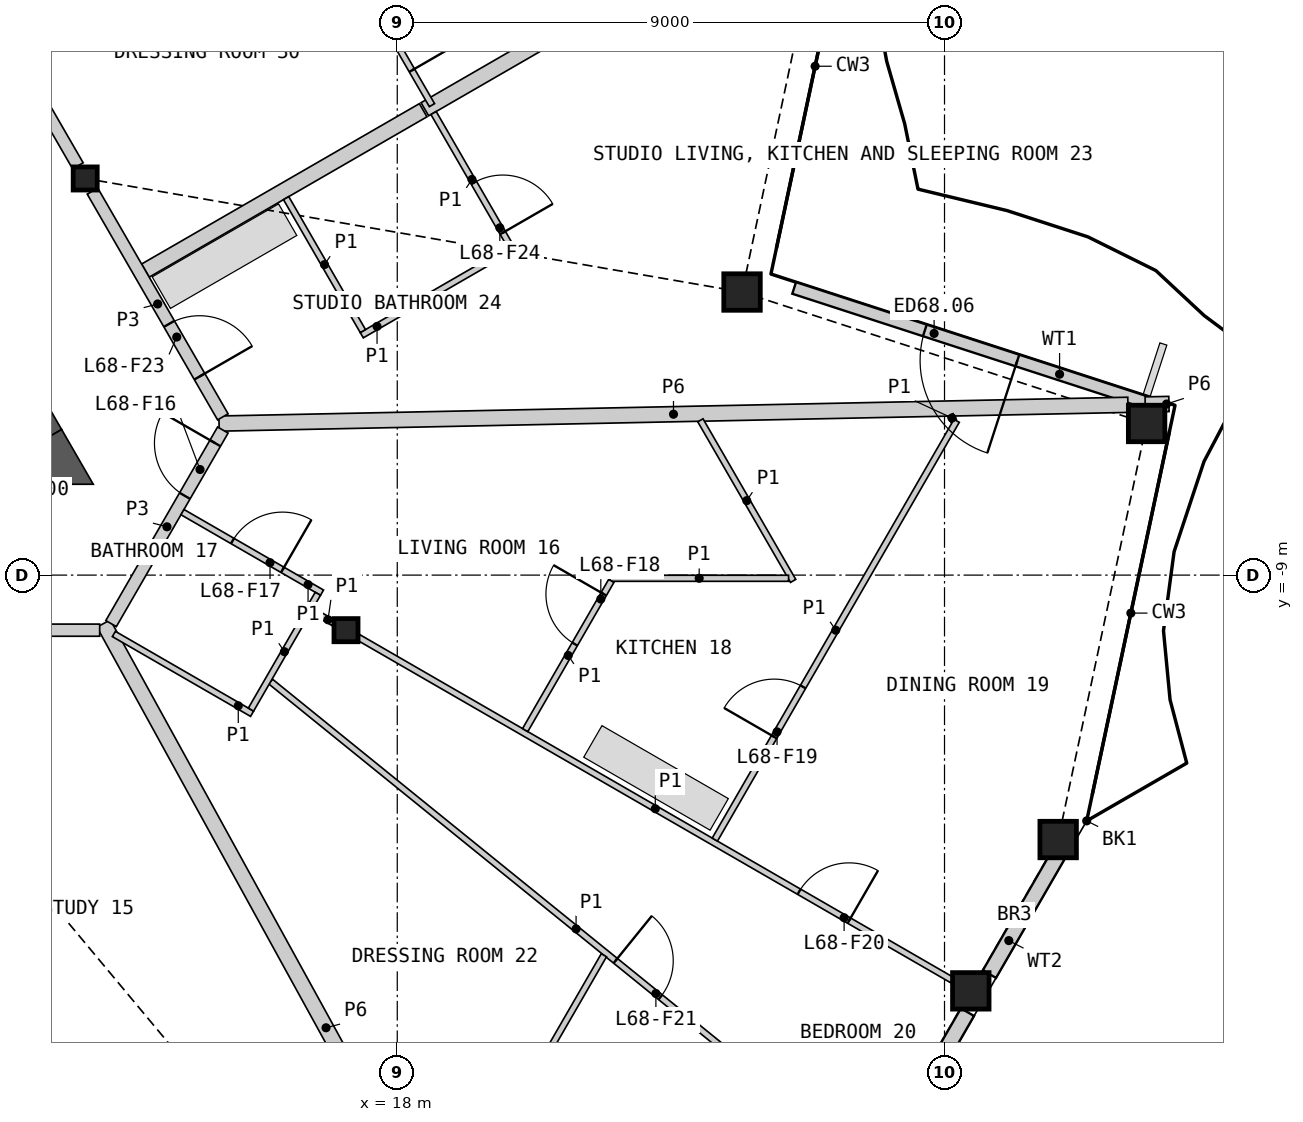
"""IFC4 building model, lengths in metres.
Left out: names, types, materials, properties, quantities, classifications, styles, units other than length and angle.
Written with IfcOpenShell. Run it as: python <this file> out.ifc"""

import sys

from ifc_helpers import new_model, si_unit, direction, frame, frame_2d, origin, origin_2d, place, context, subcontext, project, spatial, polyline, rectangle, hollow_rectangle, i_section, outline, extrude, element, fill, save


model = new_model("IFC4")
c1 = context("Model", 3, precision=1e-05, world=origin(), true_north=direction((0.0, 1.0)))
c2 = subcontext(c1, "Body", "Model", "MODEL_VIEW")
j1 = project(units=[si_unit("LENGTHUNIT", "METRE"), si_unit("PLANEANGLEUNIT", "RADIAN")], contexts=[c1])
p1 = place(None, origin())
s1 = spatial("IfcSite", under=j1, at=p1, CompositionType="ELEMENT")
p2 = place(p1, origin())
s2 = spatial("IfcBuilding", under=s1, at=p2, CompositionType="ELEMENT")
p3 = place(p2, frame((0.0, 0.0, 312.0)))
s3 = spatial("IfcBuildingStorey", under=s2, at=p3, CompositionType="ELEMENT", Elevation=312.0)
for number, where, z_axis, x_axis in (
    (1, (27.432, -15.838, 0.0), (0.0, 0.0, 1.0), (1.0, 0.0, 0.0)),
    (2, (28.869, -13.349, 0.0), (0.0, 0.0, 1.0), (1.0, 0.0, 0.0)),
    (3, (30.324, -6.506, 0.0), (0.0, 0.0, 1.0), (1.0, 0.0, 0.0)),
    (4, (23.67, -4.344, 0.0), (0.0, 0.0, 1.0), (1.0, 0.0, 0.0)),
):
    element("IfcColumn", number, at=place(p3, frame(where, z_axis=z_axis, x_axis=x_axis)), inside=s3, PredefinedType="COLUMN", context=c2, shape_type="SweptSolid", body=[
        extrude(hollow_rectangle(XDim=0.6, YDim=0.6, WallThickness=0.04, at=origin_2d()), origin(), (0.0, 0.0, 1.0), 3.4),
    ])
for number, where, z_axis, x_axis in (
    (5, (17.157, -9.906, 0.0), (0.0, 0.0, 1.0), (1.0, 0.0, 0.0)),
    (6, (12.868, -2.476, 0.0), (0.0, 0.0, 1.0), (1.0, 0.0, 0.0)),
):
    element("IfcColumn", number, at=place(p3, frame(where, z_axis=z_axis, x_axis=x_axis)), inside=s3, PredefinedType="COLUMN", context=c2, shape_type="SweptSolid", body=[
        extrude(i_section(OverallWidth=0.396, OverallDepth=0.381, WebThickness=0.019, FlangeThickness=0.03, at=origin_2d()), origin(), (0.0, 0.0, 1.0), 3.4),
    ])
p4 = place(p3, frame((26.073, -18.448, 0.0), z_axis=(0.0, 0.0, 1.0), x_axis=(0.499992367345, 0.866029810455, 0.0)))
e7 = element("IfcWall", 7, at=p4, inside=s3, PredefinedType="SOLIDWALL", context=c2, shape_type="SweptSolid", body=[
    extrude(rectangle(XDim=2.61, YDim=0.25, at=frame_2d((1.305, 0.0))), origin(), (0.0, 0.0, 1.0), 2.488),
])
p5 = place(p4, frame((0.7, 0.0, 1.6)))
e8 = element("IfcOpeningElement", 8, at=p5, cuts=e7, PredefinedType="OPENING", context=c2, shape_type="SweptSolid", body=[
    extrude(rectangle(XDim=0.9, YDim=0.6, at=frame_2d((0.45, 0.3))), frame((0.0, 0.135, 0.0), z_axis=(0.0, -1.0, 0.0), x_axis=(1.0, 0.0, 0.0)), (0.0, 0.0, 1.0), 0.27),
])
p6 = place(p3, frame((27.739, -15.563, 0.0), z_axis=(0.0, 0.0, 1.0), x_axis=(0.500012659481, 0.866018094706, 0.0)))
e9 = element("IfcWall", 9, at=p6, inside=s3, PredefinedType="SOLIDWALL", context=c2, shape_type="SweptSolid", body=[
    extrude(rectangle(XDim=2.549, YDim=0.25, at=frame_2d((1.274, 0.0))), origin(), (0.0, 0.0, 1.0), 2.488),
])
p7 = place(p3, frame((30.347, -6.168, 0.0), z_axis=(0.0, 0.0, 1.0), x_axis=(-0.951053709789, 0.309025631781, 0.0)))
e10 = element("IfcWall", 10, at=p7, inside=s3, PredefinedType="SOLIDWALL", context=c2, shape_type="SweptSolid", body=[
    extrude(rectangle(XDim=6.12, YDim=0.2, at=frame_2d((3.06, 0.0))), origin(), (0.0, 0.0, 1.0), 2.488),
])
p8 = place(p7, frame((2.26, 0.0, 0.0)))
e11 = element("IfcOpeningElement", 11, at=p8, cuts=e10, PredefinedType="OPENING", context=c2, shape_type="SweptSolid", body=[
    extrude(rectangle(XDim=1.6, YDim=2.25, at=frame_2d((0.8, 1.125))), frame((0.0, 0.11, 0.0), z_axis=(0.0, -1.0, 0.0), x_axis=(1.0, 0.0, 0.0)), (0.0, 0.0, 1.0), 0.22),
])
p9 = place(p3, frame((12.221, -6.756, 0.0), z_axis=(0.0, 0.0, 1.0), x_axis=(-0.50000604952, 0.866021911064, 0.0)))
e12 = element("IfcWall", 12, at=p9, inside=s3, PredefinedType="SHEAR", context=c2, shape_type="SweptSolid", body=[
    extrude(rectangle(XDim=4.869, YDim=0.6, at=frame_2d((2.434, 0.0))), origin(), (0.0, 0.0, 1.0), 3.1),
])
p10 = place(p3, origin())
e13 = element("IfcWall", 13, at=p10, inside=s3, PredefinedType="SHEAR", context=c2, shape_type="SweptSolid", body=[
    extrude(outline(polyline([(11.961, -7.506), (11.961, -6.906), (12.48, -6.606), (13.0, -7.506), (11.961, -7.506)])), origin(), (0.0, 0.0, 1.0), 3.1),
])
p11 = place(p3, frame((13.171, -9.796, 0.0), z_axis=(0.0, 0.0, 1.0), x_axis=(0.481999020381, -0.876171755053, 0.0)))
e14 = element("IfcWall", 14, at=p11, inside=s3, PredefinedType="PARTITIONING", context=c2, shape_type="SweptSolid", body=[
    extrude(rectangle(XDim=15.178, YDim=0.25, at=frame_2d((7.589, 0.0))), origin(), (0.0, 0.0, 1.0), 2.33),
])
p12 = place(p3, frame((15.069, -6.508, 0.0), z_axis=(0.0, 0.0, 1.0), x_axis=(0.999786619639, 0.02065708573, 0.0)))
e15 = element("IfcWall", 15, at=p12, inside=s3, PredefinedType="PARTITIONING", context=c2, shape_type="SweptSolid", body=[
    extrude(rectangle(XDim=14.951, YDim=0.25, at=frame_2d((7.475, 0.0))), origin(), (0.0, 0.0, 1.0), 2.33),
])
p13 = place(p3, frame((8.698, 4.745, 0.0), z_axis=(0.0, 0.0, 1.0), x_axis=(0.499984266882, -0.866034487114, 0.0)))
e16 = element("IfcWall", 16, at=p13, inside=s3, PredefinedType="PARTITIONING", context=c2, shape_type="SweptSolid", body=[
    extrude(rectangle(XDim=8.099, YDim=0.2, at=frame_2d((4.049, 0.0))), origin(), (0.0, 0.0, 1.0), 3.1),
])
p14 = place(p3, frame((18.454, -1.338, 0.0), z_axis=(0.0, 0.0, 1.0), x_axis=(0.866023407002, 0.500003458512, 0.0)))
e17 = element("IfcWall", 17, at=p14, inside=s3, PredefinedType="PARTITIONING", context=c2, shape_type="SweptSolid", body=[
    extrude(rectangle(XDim=7.345, YDim=0.25, at=frame_2d((3.673, 0.0))), origin(), (0.0, 0.0, 1.0), 2.33),
])
p15 = place(p3, frame((13.858, -3.991, 0.0), z_axis=(0.0, 0.0, 1.0), x_axis=(0.866032983855, 0.499986870703, 0.0)))
e18 = element("IfcWall", 18, at=p15, inside=s3, PredefinedType="PARTITIONING", context=c2, shape_type="SweptSolid", body=[
    extrude(rectangle(XDim=5.275, YDim=0.25, at=frame_2d((2.638, 0.0))), origin(), (0.0, 0.0, 1.0), 2.33),
])
p16 = place(p3, frame((8.786, -9.906, 0.0), z_axis=(0.0, 0.0, 1.0), x_axis=(1.0, 0.0, 0.0)))
e19 = element("IfcWall", 19, at=p16, inside=s3, PredefinedType="PARTITIONING", context=c2, shape_type="SweptSolid", body=[
    extrude(rectangle(XDim=4.32, YDim=0.2, at=frame_2d((2.16, 0.0))), origin(), (0.0, 0.0, 1.0), 3.1),
])
p17 = place(p3, frame((12.988, -2.684, 0.0), z_axis=(0.0, 0.0, 1.0), x_axis=(0.500003406062, -0.866023437285, 0.0)))
e20 = element("IfcWall", 20, at=p17, inside=s3, PredefinedType="PARTITIONING", context=c2, shape_type="SweptSolid", body=[
    extrude(rectangle(XDim=4.288, YDim=0.2, at=frame_2d((2.144, 0.0))), origin(), (0.0, 0.0, 1.0), 3.1),
])
p18 = place(p17, frame((2.521, 0.0, 0.0)))
e21 = element("IfcOpeningElement", 21, at=p18, cuts=e20, PredefinedType="OPENING", context=c2, shape_type="SweptSolid", body=[
    extrude(rectangle(XDim=1.0, YDim=2.1, at=frame_2d((0.5, 1.05))), frame((0.0, 0.11, 0.0), z_axis=(0.0, -1.0, 0.0), x_axis=(1.0, 0.0, 0.0)), (0.0, 0.0, 1.0), 0.22),
])
p19 = place(p3, frame((13.293, -9.797, 0.0), z_axis=(0.0, 0.0, 1.0), x_axis=(0.499967746641, 0.866044024469, 0.0)))
e22 = element("IfcWall", 22, at=p19, inside=s3, PredefinedType="PARTITIONING", context=c2, shape_type="SweptSolid", body=[
    extrude(rectangle(XDim=3.676, YDim=0.2, at=frame_2d((1.838, 0.0))), origin(), (0.0, 0.0, 1.0), 3.1),
])
p20 = place(p19, frame((2.426, 0.0, 0.0)))
e23 = element("IfcOpeningElement", 23, at=p20, cuts=e22, PredefinedType="OPENING", context=c2, shape_type="SweptSolid", body=[
    extrude(rectangle(XDim=1.0, YDim=2.1, at=frame_2d((0.5, 1.05))), frame((0.0, 0.11, 0.0), z_axis=(0.0, -1.0, 0.0), x_axis=(1.0, 0.0, 0.0)), (0.0, 0.0, 1.0), 0.22),
])
p21 = place(p3, frame((30.301, -6.193, 0.0), z_axis=(0.0, 0.0, 1.0), x_axis=(0.999786840126, 0.020646411592, 0.0)))
e24 = element("IfcWall", 24, at=p21, inside=s3, PredefinedType="PARTITIONING", context=c2, shape_type="SweptSolid", body=[
    extrude(rectangle(XDim=0.39, YDim=0.25, at=frame_2d((0.195, 0.0))), origin(), (0.0, 0.0, 1.0), 2.33),
])
p22 = place(p3, frame((15.917, -10.751, 0.0), z_axis=(0.0, 0.0, 1.0), x_axis=(0.777149866095, -0.629315569193, 0.0)))
e25 = element("IfcWall", 25, at=p22, inside=s3, PredefinedType="PARTITIONING", context=c2, shape_type="SweptSolid", body=[
    extrude(rectangle(XDim=12.927, YDim=0.1, at=frame_2d((6.464, 0.0))), origin(), (0.0, 0.0, 1.0), 2.33),
])
p23 = place(p22, frame((7.298, 0.0, 0.0)))
e26 = element("IfcOpeningElement", 26, at=p23, cuts=e25, PredefinedType="OPENING", context=c2, shape_type="SweptSolid", body=[
    extrude(rectangle(XDim=0.95, YDim=2.1, at=frame_2d((0.475, 1.05))), frame((0.0, 0.06, 0.0), z_axis=(0.0, -1.0, 0.0), x_axis=(1.0, 0.0, 0.0)), (0.0, 0.0, 1.0), 0.12),
])
p24 = place(p3, frame((17.365, -10.025, 0.0), z_axis=(0.0, 0.0, 1.0), x_axis=(0.866021046153, -0.500007547564, 0.0)))
e27 = element("IfcWall", 27, at=p24, inside=s3, PredefinedType="PARTITIONING", context=c2, shape_type="SweptSolid", body=[
    extrude(rectangle(XDim=11.267, YDim=0.1, at=frame_2d((5.634, 0.0))), origin(), (0.0, 0.0, 1.0), 2.33),
])
p25 = place(p24, frame((8.364, 0.0, 0.0)))
e28 = element("IfcOpeningElement", 28, at=p25, cuts=e27, PredefinedType="OPENING", context=c2, shape_type="SweptSolid", body=[
    extrude(rectangle(XDim=0.95, YDim=2.1, at=frame_2d((0.475, 1.05))), frame((0.0, 0.06, 0.0), z_axis=(0.0, -1.0, 0.0), x_axis=(1.0, 0.0, 0.0)), (0.0, 0.0, 1.0), 0.12),
])
p26 = place(p3, frame((23.223, -13.35, 0.0), z_axis=(0.0, 0.0, 1.0), x_axis=(0.500018284498, 0.866014846967, 0.0)))
e29 = element("IfcWall", 29, at=p26, inside=s3, PredefinedType="PARTITIONING", context=c2, shape_type="SweptSolid", body=[
    extrude(rectangle(XDim=7.953, YDim=0.1, at=frame_2d((3.977, 0.0))), origin(), (0.0, 0.0, 1.0), 2.33),
])
p27 = place(p26, frame((1.951, 0.0, 0.0)))
e30 = element("IfcOpeningElement", 30, at=p27, cuts=e29, PredefinedType="OPENING", context=c2, shape_type="SweptSolid", body=[
    extrude(rectangle(XDim=0.95, YDim=2.1, at=frame_2d((0.475, 1.05))), frame((0.0, 0.06, 0.0), z_axis=(0.0, -1.0, 0.0), x_axis=(1.0, 0.0, 0.0)), (0.0, 0.0, 1.0), 0.12),
])
p28 = place(p3, frame((15.999, 3.183, 0.0), z_axis=(0.0, 0.0, 1.0), x_axis=(0.500014207086, -0.866017201164, 0.0)))
e31 = element("IfcWall", 31, at=p28, inside=s3, PredefinedType="PARTITIONING", context=c2, shape_type="SweptSolid", body=[
    extrude(rectangle(XDim=5.143, YDim=0.1, at=frame_2d((2.571, 0.0))), origin(), (0.0, 0.0, 1.0), 2.33),
])
p29 = place(p28, frame((3.532, 0.0, 0.0)))
e32 = element("IfcOpeningElement", 32, at=p29, cuts=e31, PredefinedType="OPENING", context=c2, shape_type="SweptSolid", body=[
    extrude(rectangle(XDim=0.95, YDim=2.1, at=frame_2d((0.475, 1.05))), frame((0.0, 0.06, 0.0), z_axis=(0.0, -1.0, 0.0), x_axis=(1.0, 0.0, 0.0)), (0.0, 0.0, 1.0), 0.12),
])
p30 = place(p3, frame((18.833, -19.695, 0.0), z_axis=(0.0, 0.0, 1.0), x_axis=(0.500034163155, 0.866005678779, 0.0)))
e33 = element("IfcWall", 33, at=p30, inside=s3, PredefinedType="PARTITIONING", context=c2, shape_type="SweptSolid", body=[
    extrude(rectangle(XDim=5.13, YDim=0.1, at=frame_2d((2.565, 0.0))), origin(), (0.0, 0.0, 1.0), 2.33),
])
p31 = place(p30, frame((1.681, 0.0, 0.0)))
e34 = element("IfcOpeningElement", 34, at=p31, cuts=e33, PredefinedType="OPENING", context=c2, shape_type="SweptSolid", body=[
    extrude(rectangle(XDim=0.95, YDim=2.1, at=frame_2d((0.475, 1.05))), frame((0.0, 0.06, 0.0), z_axis=(0.0, -1.0, 0.0), x_axis=(1.0, 0.0, 0.0)), (0.0, 0.0, 1.0), 0.12),
])
p32 = place(p3, frame((22.986, -6.454, 0.0), z_axis=(0.0, 0.0, 1.0), x_axis=(0.499978833458, -0.866037623948, 0.0)))
e35 = element("IfcWall", 35, at=p32, inside=s3, PredefinedType="PARTITIONING", context=c2, shape_type="SweptSolid", body=[
    extrude(rectangle(XDim=3.05, YDim=0.1, at=frame_2d((1.525, 0.0))), origin(), (0.0, 0.0, 1.0), 2.33),
])
p33 = place(p3, frame((21.495, -9.052, 0.0), z_axis=(0.0, 0.0, 1.0), x_axis=(1.0, 0.0, 0.0)))
e36 = element("IfcWall", 36, at=p33, inside=s3, PredefinedType="PARTITIONING", context=c2, shape_type="SweptSolid", body=[
    extrude(rectangle(XDim=2.94, YDim=0.1, at=frame_2d((1.47, 0.0))), origin(), (0.0, 0.0, 1.0), 2.33),
])
p34 = place(p3, frame((20.104, -11.549, 0.0), z_axis=(0.0, 0.0, 1.0), x_axis=(0.499976073514, 0.866039217307, 0.0)))
e37 = element("IfcWall", 37, at=p34, inside=s3, PredefinedType="PARTITIONING", context=c2, shape_type="SweptSolid", body=[
    extrude(rectangle(XDim=2.833, YDim=0.1, at=frame_2d((1.417, 0.0))), origin(), (0.0, 0.0, 1.0), 2.33),
])
p35 = place(p34, frame((1.633, 0.0, 0.0)))
e38 = element("IfcOpeningElement", 38, at=p35, cuts=e37, PredefinedType="OPENING", context=c2, shape_type="SweptSolid", body=[
    extrude(rectangle(XDim=0.95, YDim=2.1, at=frame_2d((0.475, 1.05))), frame((0.0, 0.06, 0.0), z_axis=(0.0, -1.0, 0.0), x_axis=(1.0, 0.0, 0.0)), (0.0, 0.0, 1.0), 0.12),
])
p36 = place(p3, frame((17.416, -5.055, 0.0), z_axis=(0.0, 0.0, 1.0), x_axis=(0.866032775405, 0.499987231761, 0.0)))
e39 = element("IfcWall", 39, at=p36, inside=s3, PredefinedType="PARTITIONING", context=c2, shape_type="SweptSolid", body=[
    extrude(rectangle(XDim=2.9, YDim=0.1, at=frame_2d((1.45, 0.0))), origin(), (0.0, 0.0, 1.0), 2.33),
])
p37 = place(p3, frame((16.172, -2.8, 0.0), z_axis=(0.0, 0.0, 1.0), x_axis=(0.50001820224, -0.866014894461, 0.0)))
e40 = element("IfcWall", 40, at=p37, inside=s3, PredefinedType="PARTITIONING", context=c2, shape_type="SweptSolid", body=[
    extrude(rectangle(XDim=2.525, YDim=0.1, at=frame_2d((1.262, 0.0))), origin(), (0.0, 0.0, 1.0), 2.33),
])
p38 = place(p3, frame((18.597, -1.4, 0.0), z_axis=(0.0, 0.0, 1.0), x_axis=(0.499976333282, -0.866039067339, 0.0)))
e41 = element("IfcWall", 41, at=p38, inside=s3, PredefinedType="PARTITIONING", context=c2, shape_type="SweptSolid", body=[
    extrude(rectangle(XDim=2.525, YDim=0.1, at=frame_2d((1.262, 0.0))), origin(), (0.0, 0.0, 1.0), 2.33),
])
p39 = place(p38, frame((1.325, 0.0, 0.0)))
e42 = element("IfcOpeningElement", 42, at=p39, cuts=e41, PredefinedType="OPENING", context=c2, shape_type="SweptSolid", body=[
    extrude(rectangle(XDim=0.95, YDim=2.1, at=frame_2d((0.475, 1.05))), frame((0.0, 0.06, 0.0), z_axis=(0.0, -1.0, 0.0), x_axis=(1.0, 0.0, 0.0)), (0.0, 0.0, 1.0), 0.12),
])
p40 = place(p3, frame((14.468, -7.964, 0.0), z_axis=(0.0, 0.0, 1.0), x_axis=(0.865989200783, -0.500062700197, 0.0)))
e43 = element("IfcWall", 43, at=p40, inside=s3, PredefinedType="PARTITIONING", context=c2, shape_type="SweptSolid", body=[
    extrude(rectangle(XDim=2.65, YDim=0.1, at=frame_2d((1.325, 0.0))), origin(), (0.0, 0.0, 1.0), 2.33),
])
p41 = place(p40, frame((0.95, 0.0, 0.0)))
e44 = element("IfcOpeningElement", 44, at=p41, cuts=e43, PredefinedType="OPENING", context=c2, shape_type="SweptSolid", body=[
    extrude(rectangle(XDim=0.95, YDim=2.1, at=frame_2d((0.475, 1.05))), frame((0.0, 0.06, 0.0), z_axis=(0.0, -1.0, 0.0), x_axis=(1.0, 0.0, 0.0)), (0.0, 0.0, 1.0), 0.12),
])
p42 = place(p3, frame((13.339, -9.968, 0.0), z_axis=(0.0, 0.0, 1.0), x_axis=(0.866013657776, -0.500020344131, 0.0)))
e45 = element("IfcWall", 45, at=p42, inside=s3, PredefinedType="PARTITIONING", context=c2, shape_type="SweptSolid", body=[
    extrude(rectangle(XDim=2.625, YDim=0.1, at=frame_2d((1.312, 0.0))), origin(), (0.0, 0.0, 1.0), 2.33),
])
p43 = place(p3, frame((15.594, -11.212, 0.0), z_axis=(0.0, 0.0, 1.0), x_axis=(0.499981787252, 0.866035918664, 0.0)))
e46 = element("IfcWall", 46, at=p43, inside=s3, PredefinedType="PARTITIONING", context=c2, shape_type="SweptSolid", body=[
    extrude(rectangle(XDim=2.2, YDim=0.1, at=frame_2d((1.1, 0.0))), origin(), (0.0, 0.0, 1.0), 2.33),
])
p44 = place(p3, frame((16.594, -9.581, 0.0), z_axis=(0.0, 0.0, 1.0), x_axis=(0.866036909293, -0.499980071345, 0.0)))
e47 = element("IfcWall", 47, at=p44, inside=s3, PredefinedType="PARTITIONING", context=c2, shape_type="SweptSolid", body=[
    extrude(rectangle(XDim=0.41, YDim=0.1, at=frame_2d((0.205, 0.0))), origin(), (0.0, 0.0, 1.0), 2.33),
])
p45 = place(p3, frame((27.096, -6.369, 0.0), z_axis=(0.0, 0.0, 1.0), x_axis=(0.500768285049, -0.865581379588, 0.0)))
e48 = element("IfcWall", 48, at=p45, inside=s3, PredefinedType="PARTITIONING", context=c2, shape_type="SweptSolid", body=[
    extrude(rectangle(XDim=0.108, YDim=0.1, at=frame_2d((0.054, 0.0))), origin(), (0.0, 0.0, 1.0), 2.33),
])
p46 = place(p8, origin())
e49 = element("IfcDoor", 49, at=p46, inside=s3, OperationType="DOUBLE_DOOR_SINGLE_SWING", PredefinedType="DOOR", context=c2, shape_type="SweptSolid", body=[
    extrude(rectangle(XDim=1.6, YDim=2.25, at=frame_2d((0.8, 1.125))), frame((0.0, 0.025, 0.0), z_axis=(0.0, -1.0, 0.0), x_axis=(1.0, 0.0, 0.0)), (0.0, 0.0, 1.0), 0.05),
])
fill(e11, e49)
p47 = place(p20, origin())
e50 = element("IfcDoor", 50, at=p47, inside=s3, OperationType="SINGLE_SWING_RIGHT", PredefinedType="DOOR", context=c2, shape_type="SweptSolid", body=[
    extrude(rectangle(XDim=1.0, YDim=2.1, at=frame_2d((0.5, 1.05))), frame((0.0, 0.025, 0.0), z_axis=(0.0, -1.0, 0.0), x_axis=(1.0, 0.0, 0.0)), (0.0, 0.0, 1.0), 0.05),
])
fill(e23, e50)
p48 = place(p41, origin())
e51 = element("IfcDoor", 51, at=p48, inside=s3, OperationType="SINGLE_SWING_RIGHT", PredefinedType="DOOR", context=c2, shape_type="SweptSolid", body=[
    extrude(rectangle(XDim=0.95, YDim=2.1, at=frame_2d((0.475, 1.05))), frame((0.0, 0.025, 0.0), z_axis=(0.0, -1.0, 0.0), x_axis=(1.0, 0.0, 0.0)), (0.0, 0.0, 1.0), 0.05),
])
fill(e44, e51)
p49 = place(p35, origin())
e52 = element("IfcDoor", 52, at=p49, inside=s3, OperationType="SINGLE_SWING_RIGHT", PredefinedType="DOOR", context=c2, shape_type="SweptSolid", body=[
    extrude(rectangle(XDim=0.95, YDim=2.1, at=frame_2d((0.475, 1.05))), frame((0.0, 0.025, 0.0), z_axis=(0.0, -1.0, 0.0), x_axis=(1.0, 0.0, 0.0)), (0.0, 0.0, 1.0), 0.05),
])
fill(e38, e52)
p50 = place(p27, origin())
e53 = element("IfcDoor", 53, at=p50, inside=s3, OperationType="SINGLE_SWING_LEFT", PredefinedType="DOOR", context=c2, shape_type="SweptSolid", body=[
    extrude(rectangle(XDim=0.95, YDim=2.1, at=frame_2d((0.475, 1.05))), frame((0.0, 0.025, 0.0), z_axis=(0.0, -1.0, 0.0), x_axis=(1.0, 0.0, 0.0)), (0.0, 0.0, 1.0), 0.05),
])
fill(e30, e53)
p51 = place(p25, origin())
e54 = element("IfcDoor", 54, at=p51, inside=s3, OperationType="SINGLE_SWING_RIGHT", PredefinedType="DOOR", context=c2, shape_type="SweptSolid", body=[
    extrude(rectangle(XDim=0.95, YDim=2.1, at=frame_2d((0.475, 1.05))), frame((0.0, 0.025, 0.0), z_axis=(0.0, -1.0, 0.0), x_axis=(1.0, 0.0, 0.0)), (0.0, 0.0, 1.0), 0.05),
])
fill(e28, e54)
p52 = place(p23, origin())
e55 = element("IfcDoor", 55, at=p52, inside=s3, OperationType="SINGLE_SWING_LEFT", PredefinedType="DOOR", context=c2, shape_type="SweptSolid", body=[
    extrude(rectangle(XDim=0.95, YDim=2.1, at=frame_2d((0.475, 1.05))), frame((0.0, 0.025, 0.0), z_axis=(0.0, -1.0, 0.0), x_axis=(1.0, 0.0, 0.0)), (0.0, 0.0, 1.0), 0.05),
])
fill(e26, e55)
p53 = place(p18, origin())
e56 = element("IfcDoor", 56, at=p53, inside=s3, OperationType="SINGLE_SWING_RIGHT", PredefinedType="DOOR", context=c2, shape_type="SweptSolid", body=[
    extrude(rectangle(XDim=1.0, YDim=2.1, at=frame_2d((0.5, 1.05))), frame((0.0, 0.025, 0.0), z_axis=(0.0, -1.0, 0.0), x_axis=(1.0, 0.0, 0.0)), (0.0, 0.0, 1.0), 0.05),
])
fill(e21, e56)
p54 = place(p39, origin())
e57 = element("IfcDoor", 57, at=p54, inside=s3, OperationType="SINGLE_SWING_RIGHT", PredefinedType="DOOR", context=c2, shape_type="SweptSolid", body=[
    extrude(rectangle(XDim=0.95, YDim=2.1, at=frame_2d((0.475, 1.05))), frame((0.0, 0.025, 0.0), z_axis=(0.0, -1.0, 0.0), x_axis=(1.0, 0.0, 0.0)), (0.0, 0.0, 1.0), 0.05),
])
fill(e42, e57)
p55 = place(p29, origin())
e58 = element("IfcDoor", 58, at=p55, inside=s3, OperationType="SINGLE_SWING_RIGHT", PredefinedType="DOOR", context=c2, shape_type="SweptSolid", body=[
    extrude(rectangle(XDim=0.95, YDim=2.1, at=frame_2d((0.475, 1.05))), frame((0.0, 0.025, 0.0), z_axis=(0.0, -1.0, 0.0), x_axis=(1.0, 0.0, 0.0)), (0.0, 0.0, 1.0), 0.05),
])
fill(e32, e58)
save(model, sys.argv[1])
